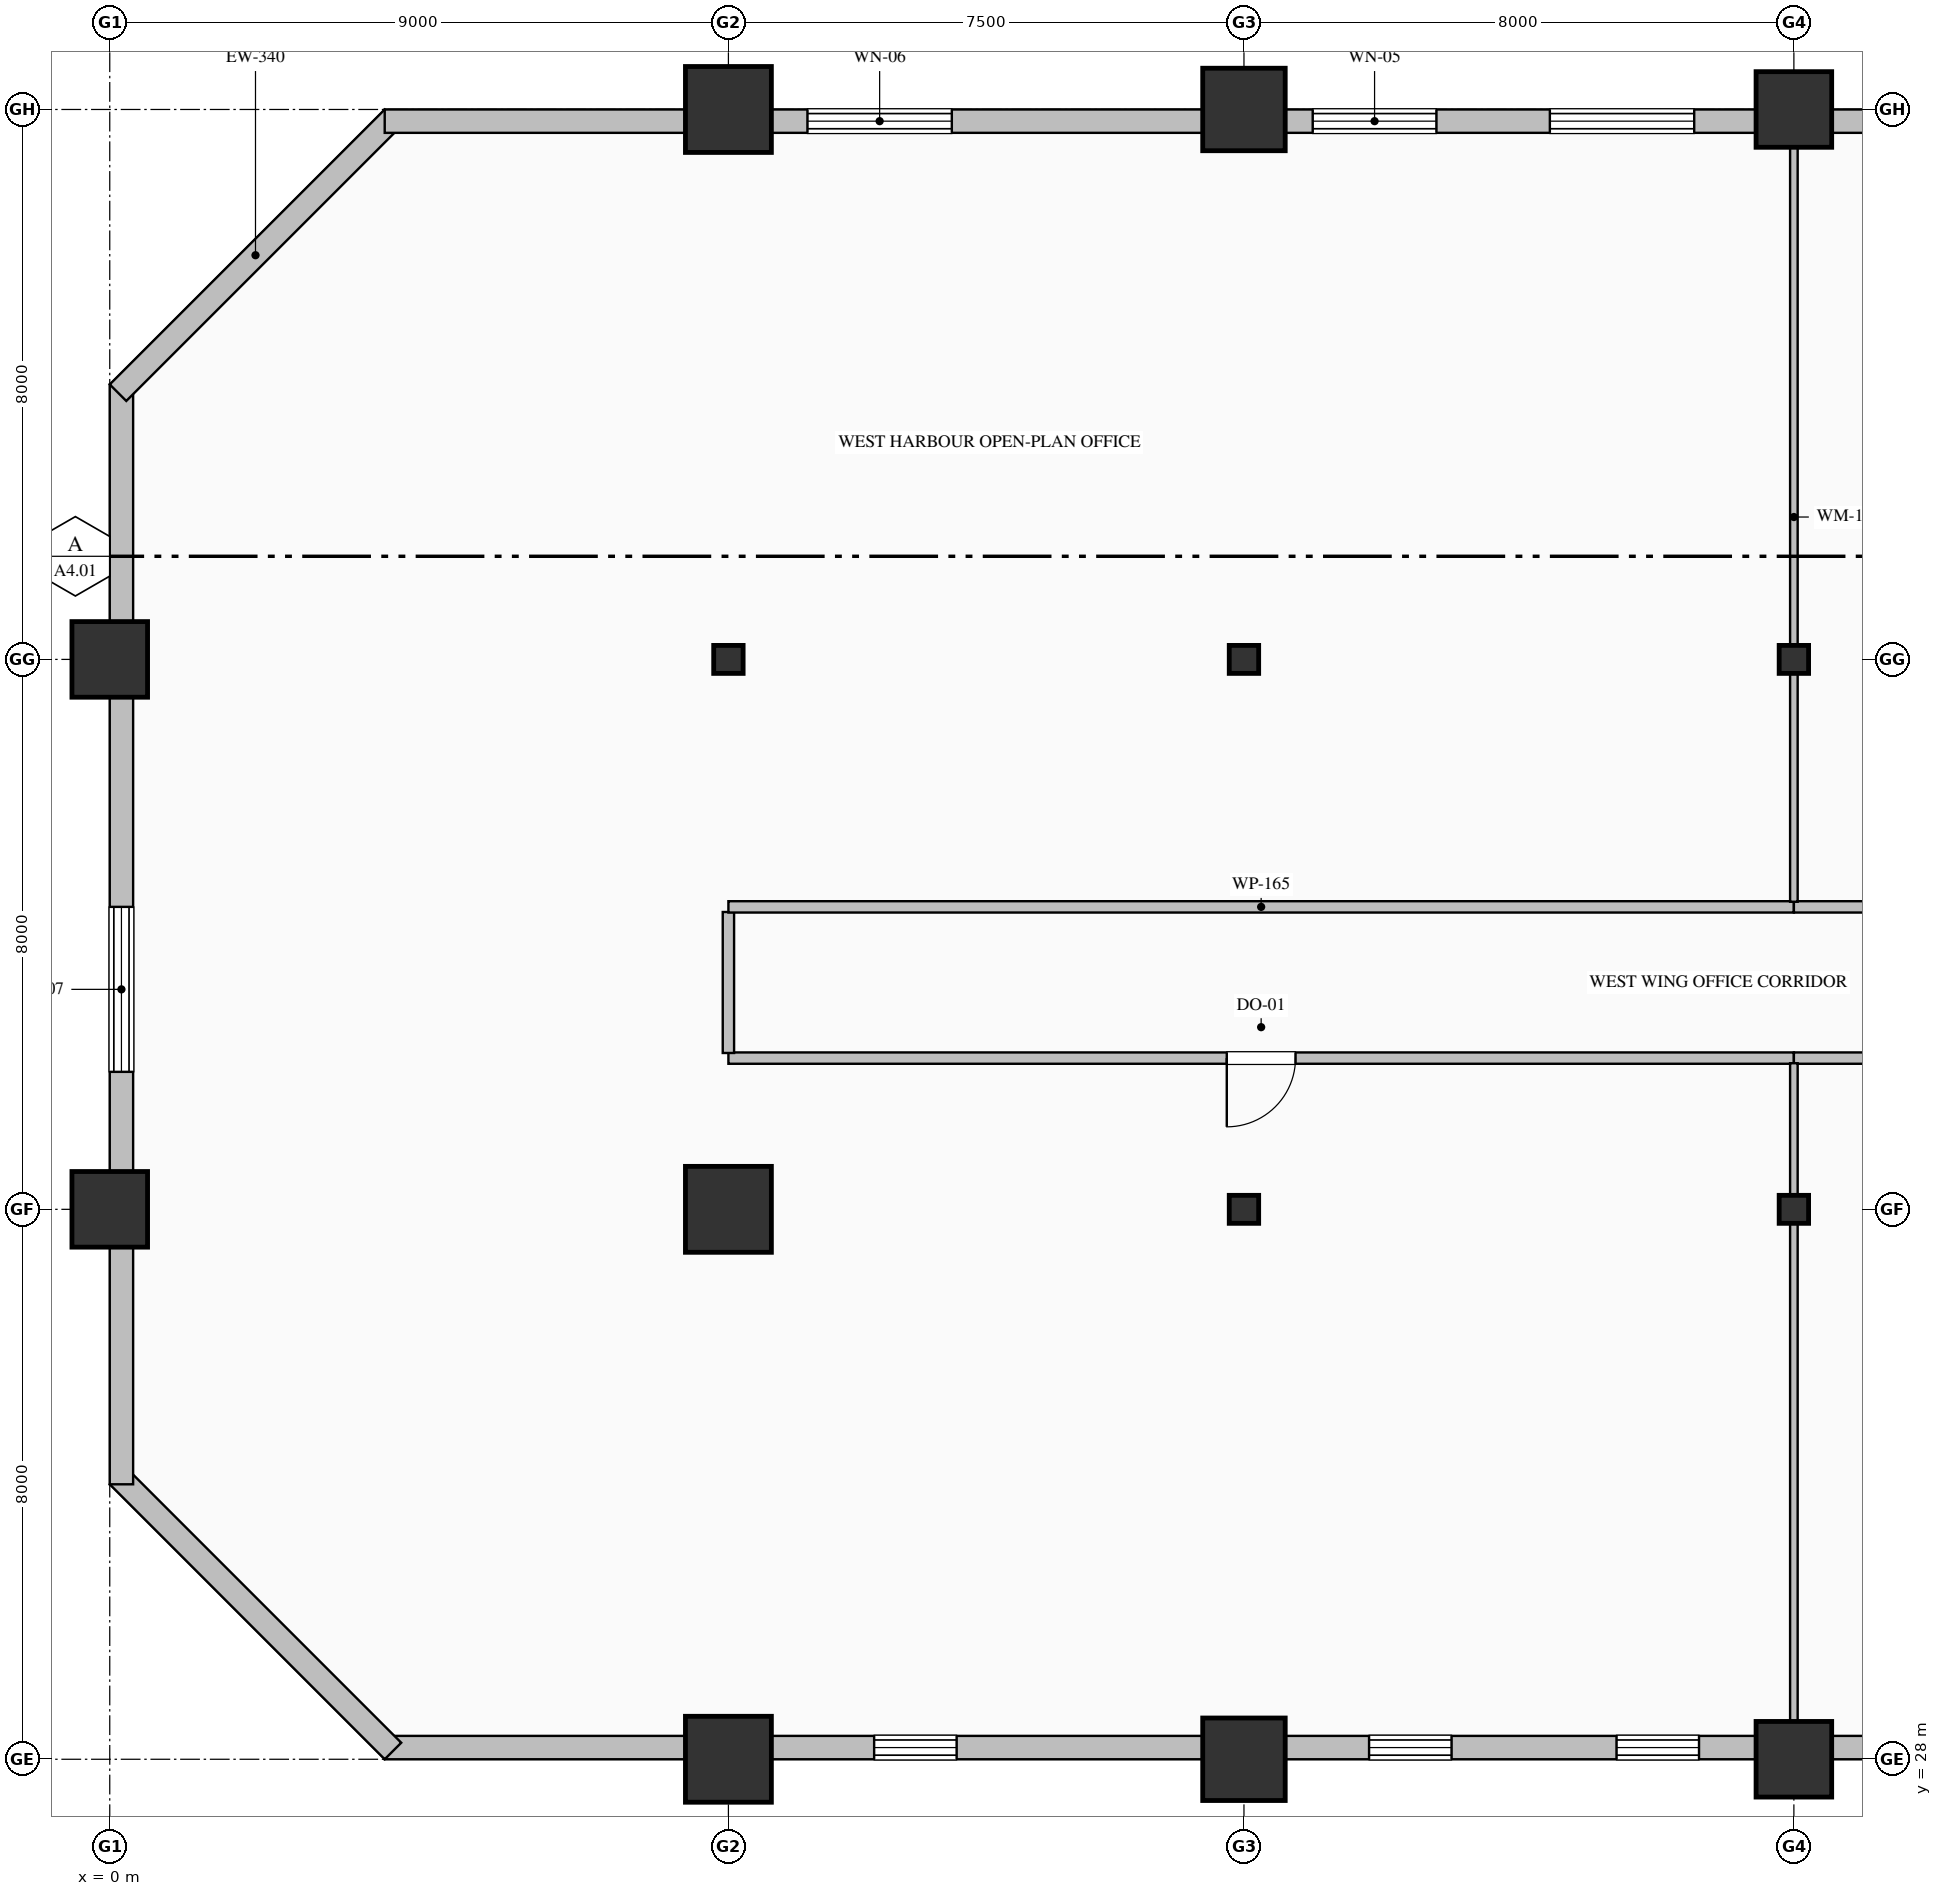
"""IFC4 building model, lengths in metres.
Left out: names, types, materials, properties, quantities, classifications, styles, units other than length and angle.
Written with IfcOpenShell. Run it as: python <this file> out.ifc"""

import sys

from ifc_helpers import new_model, si_unit, direction, frame, frame_2d, origin, origin_2d, place, context, subcontext, project, spatial, rectangle, hollow_rectangle, hollow_circle, i_section, extrude, element, fill, save


model = new_model("IFC4")
c1 = context("Model", 3, precision=1e-05, world=origin(), true_north=direction((0.0, 1.0)))
c2 = subcontext(c1, "Body", "Model", "MODEL_VIEW")
j1 = project(units=[si_unit("LENGTHUNIT", "METRE"), si_unit("PLANEANGLEUNIT", "RADIAN")], contexts=[c1])
p1 = place(None, origin())
s1 = spatial("IfcSite", under=j1, at=p1, CompositionType="ELEMENT")
p2 = place(p1, origin())
s2 = spatial("IfcBuilding", under=s1, at=p2, CompositionType="ELEMENT")
p3 = place(p2, frame((0.0, 0.0, 56.2)))
s3 = spatial("IfcBuildingStorey", under=s2, at=p3, CompositionType="ELEMENT", Elevation=56.2)
for number, where, z_axis, x_axis in (
    (1, (0.0, 36.0, 0.0), (0.0, 0.0, 1.0), (1.0, 0.0, 0.0)),
    (2, (0.0, 44.0, 0.0), (0.0, 0.0, 1.0), (1.0, 0.0, 0.0)),
):
    element("IfcColumn", number, at=place(p3, frame(where, z_axis=z_axis, x_axis=x_axis)), inside=s3, PredefinedType="COLUMN", context=c2, shape_type="SweptSolid", body=[
        extrude(hollow_rectangle(XDim=1.1, YDim=1.1, WallThickness=0.04, at=origin_2d()), origin(), (0.0, 0.0, 1.0), 4.0),
    ])
for number, where, z_axis, x_axis in (
    (3, (9.0, 28.0, 0.0), (0.0, 0.0, 1.0), (1.0, 0.0, 0.0)),
    (4, (9.0, 36.0, 0.0), (0.0, 0.0, 1.0), (1.0, 0.0, 0.0)),
):
    element("IfcColumn", number, at=place(p3, frame(where, z_axis=z_axis, x_axis=x_axis)), inside=s3, PredefinedType="COLUMN", context=c2, shape_type="SweptSolid", body=[
        extrude(hollow_rectangle(XDim=1.25, YDim=1.25, WallThickness=0.045, at=origin_2d()), origin(), (0.0, 0.0, 1.0), 4.0),
    ])
p4 = place(p3, frame((9.0, 44.0, 0.0), z_axis=(0.0, 0.0, 1.0), x_axis=(1.0, 0.0, 0.0)))
e5 = element("IfcColumn", 5, at=p4, inside=s3, PredefinedType="COLUMN", context=c2, shape_type="SweptSolid", body=[
    extrude(i_section(OverallWidth=0.407, OverallDepth=0.428, WebThickness=0.02, FlangeThickness=0.035, FilletRadius=0.022, at=origin_2d()), origin(), (0.0, 0.0, 1.0), 4.0),
])
p5 = place(p3, frame((9.0, 52.0, 0.0), z_axis=(0.0, 0.0, 1.0), x_axis=(1.0, 0.0, 0.0)))
e6 = element("IfcColumn", 6, at=p5, inside=s3, PredefinedType="COLUMN", context=c2, shape_type="SweptSolid", body=[
    extrude(hollow_rectangle(XDim=1.25, YDim=1.25, WallThickness=0.045, at=origin_2d()), origin(), (0.0, 0.0, 1.0), 4.0),
])
p6 = place(p3, frame((16.5, 28.0, 0.0), z_axis=(0.0, 0.0, 1.0), x_axis=(1.0, 0.0, 0.0)))
e7 = element("IfcColumn", 7, at=p6, inside=s3, PredefinedType="COLUMN", context=c2, shape_type="SweptSolid", body=[
    extrude(hollow_circle(Radius=0.6, WallThickness=0.04, at=origin_2d()), origin(), (0.0, 0.0, 1.0), 4.0),
])
for number, where, z_axis, x_axis in (
    (8, (16.5, 36.0, 0.0), (0.0, 0.0, 1.0), (1.0, 0.0, 0.0)),
    (9, (16.5, 44.0, 0.0), (0.0, 0.0, 1.0), (1.0, 0.0, 0.0)),
):
    element("IfcColumn", number, at=place(p3, frame(where, z_axis=z_axis, x_axis=x_axis)), inside=s3, PredefinedType="COLUMN", context=c2, shape_type="SweptSolid", body=[
        extrude(i_section(OverallWidth=0.407, OverallDepth=0.428, WebThickness=0.02, FlangeThickness=0.035, FilletRadius=0.022, at=origin_2d()), origin(), (0.0, 0.0, 1.0), 4.0),
    ])
p7 = place(p3, frame((16.5, 52.0, 0.0), z_axis=(0.0, 0.0, 1.0), x_axis=(1.0, 0.0, 0.0)))
e10 = element("IfcColumn", 10, at=p7, inside=s3, PredefinedType="COLUMN", context=c2, shape_type="SweptSolid", body=[
    extrude(hollow_circle(Radius=0.6, WallThickness=0.04, at=origin_2d()), origin(), (0.0, 0.0, 1.0), 4.0),
])
p8 = place(p3, frame((24.5, 28.0, 0.0), z_axis=(0.0, 0.0, 1.0), x_axis=(1.0, 0.0, 0.0)))
e11 = element("IfcColumn", 11, at=p8, inside=s3, PredefinedType="COLUMN", context=c2, shape_type="SweptSolid", body=[
    extrude(hollow_rectangle(XDim=1.1, YDim=1.1, WallThickness=0.04, at=origin_2d()), origin(), (0.0, 0.0, 1.0), 4.0),
])
for number, where, z_axis, x_axis in (
    (12, (24.5, 36.0, 0.0), (0.0, 0.0, 1.0), (1.0, 0.0, 0.0)),
    (13, (24.5, 44.0, 0.0), (0.0, 0.0, 1.0), (1.0, 0.0, 0.0)),
):
    element("IfcColumn", number, at=place(p3, frame(where, z_axis=z_axis, x_axis=x_axis)), inside=s3, PredefinedType="COLUMN", context=c2, shape_type="SweptSolid", body=[
        extrude(i_section(OverallWidth=0.407, OverallDepth=0.428, WebThickness=0.02, FlangeThickness=0.035, FilletRadius=0.022, at=origin_2d()), origin(), (0.0, 0.0, 1.0), 4.0),
    ])
p9 = place(p3, frame((24.5, 52.0, 0.0), z_axis=(0.0, 0.0, 1.0), x_axis=(1.0, 0.0, 0.0)))
e14 = element("IfcColumn", 14, at=p9, inside=s3, PredefinedType="COLUMN", context=c2, shape_type="SweptSolid", body=[
    extrude(hollow_rectangle(XDim=1.1, YDim=1.1, WallThickness=0.04, at=origin_2d()), origin(), (0.0, 0.0, 1.0), 4.0),
])
p10 = place(p3, frame((40.52, 28.17, 0.0), z_axis=(0.0, 0.0, 1.0), x_axis=(-1.0, 0.0, 0.0)))
e15 = element("IfcWall", 15, at=p10, inside=s3, PredefinedType="SOLIDWALL", context=c2, shape_type="SweptSolid", body=[
    extrude(rectangle(XDim=36.52, YDim=0.34, at=frame_2d((18.26, 0.0))), origin(), (0.0, 0.0, 1.0), 3.05),
])
p11 = place(p10, frame((10.2, 0.0, 0.7)))
e16 = element("IfcOpeningElement", 16, at=p11, cuts=e15, PredefinedType="OPENING", context=c2, shape_type="SweptSolid", body=[
    extrude(rectangle(XDim=1.2, YDim=1.85, at=frame_2d((0.6, 0.925))), frame((0.0, 0.18, 0.0), z_axis=(0.0, -1.0, 0.0), x_axis=(1.0, 0.0, 0.0)), (0.0, 0.0, 1.0), 0.36),
])
p12 = place(p10, frame((13.8, 0.0, 0.7)))
e17 = element("IfcOpeningElement", 17, at=p12, cuts=e15, PredefinedType="OPENING", context=c2, shape_type="SweptSolid", body=[
    extrude(rectangle(XDim=1.2, YDim=1.85, at=frame_2d((0.6, 0.925))), frame((0.0, 0.18, 0.0), z_axis=(0.0, -1.0, 0.0), x_axis=(1.0, 0.0, 0.0)), (0.0, 0.0, 1.0), 0.36),
])
p13 = place(p10, frame((17.4, 0.0, 0.7)))
e18 = element("IfcOpeningElement", 18, at=p13, cuts=e15, PredefinedType="OPENING", context=c2, shape_type="SweptSolid", body=[
    extrude(rectangle(XDim=1.2, YDim=1.85, at=frame_2d((0.6, 0.925))), frame((0.0, 0.18, 0.0), z_axis=(0.0, -1.0, 0.0), x_axis=(1.0, 0.0, 0.0)), (0.0, 0.0, 1.0), 0.36),
])
p14 = place(p10, frame((21.0, 0.0, 0.7)))
e19 = element("IfcOpeningElement", 19, at=p14, cuts=e15, PredefinedType="OPENING", context=c2, shape_type="SweptSolid", body=[
    extrude(rectangle(XDim=1.2, YDim=1.85, at=frame_2d((0.6, 0.925))), frame((0.0, 0.18, 0.0), z_axis=(0.0, -1.0, 0.0), x_axis=(1.0, 0.0, 0.0)), (0.0, 0.0, 1.0), 0.36),
])
p15 = place(p10, frame((28.2, 0.0, 0.7)))
e20 = element("IfcOpeningElement", 20, at=p15, cuts=e15, PredefinedType="OPENING", context=c2, shape_type="SweptSolid", body=[
    extrude(rectangle(XDim=1.2, YDim=1.85, at=frame_2d((0.6, 0.925))), frame((0.0, 0.18, 0.0), z_axis=(0.0, -1.0, 0.0), x_axis=(1.0, 0.0, 0.0)), (0.0, 0.0, 1.0), 0.36),
])
p16 = place(p3, frame((4.12, 28.12, 0.0), z_axis=(0.0, 0.0, 1.0), x_axis=(-0.707106781187, 0.707106781187, 0.0)))
e21 = element("IfcWall", 21, at=p16, inside=s3, PredefinedType="SOLIDWALL", context=c2, shape_type="SweptSolid", body=[
    extrude(rectangle(XDim=5.657, YDim=0.34, at=frame_2d((2.828, 0.0))), origin(), (0.0, 0.0, 1.0), 3.75),
])
p17 = place(p3, frame((0.17, 32.0, 0.0), z_axis=(0.0, 0.0, 1.0), x_axis=(0.0, 1.0, 0.0)))
e22 = element("IfcWall", 22, at=p17, inside=s3, PredefinedType="SOLIDWALL", context=c2, shape_type="SweptSolid", body=[
    extrude(rectangle(XDim=16.0, YDim=0.34, at=frame_2d((8.0, 0.0))), origin(), (0.0, 0.0, 1.0), 3.25),
])
p18 = place(p17, frame((6.0, 0.0, 0.8)))
e23 = element("IfcOpeningElement", 23, at=p18, cuts=e22, PredefinedType="OPENING", context=c2, shape_type="SweptSolid", body=[
    extrude(rectangle(XDim=2.4, YDim=2.15, at=frame_2d((1.2, 1.075))), frame((0.0, 0.18, 0.0), z_axis=(0.0, -1.0, 0.0), x_axis=(1.0, 0.0, 0.0)), (0.0, 0.0, 1.0), 0.36),
])
p19 = place(p3, frame((0.12, 47.88, 0.0), z_axis=(0.0, 0.0, 1.0), x_axis=(0.707106781187, 0.707106781187, 0.0)))
e24 = element("IfcWall", 24, at=p19, inside=s3, PredefinedType="SOLIDWALL", context=c2, shape_type="SweptSolid", body=[
    extrude(rectangle(XDim=5.657, YDim=0.34, at=frame_2d((2.828, 0.0))), origin(), (0.0, 0.0, 1.0), 3.75),
])
p20 = place(p3, frame((4.0, 51.83, 0.0), z_axis=(0.0, 0.0, 1.0), x_axis=(1.0, 0.0, 0.0)))
e25 = element("IfcWall", 25, at=p20, inside=s3, PredefinedType="SOLIDWALL", context=c2, shape_type="SweptSolid", body=[
    extrude(rectangle(XDim=36.52, YDim=0.34, at=frame_2d((18.26, 0.0))), origin(), (0.0, 0.0, 1.0), 3.25),
])
p21 = place(p20, frame((6.15, 0.0, 0.85)))
e26 = element("IfcOpeningElement", 26, at=p21, cuts=e25, PredefinedType="OPENING", context=c2, shape_type="SweptSolid", body=[
    extrude(rectangle(XDim=2.1, YDim=2.05, at=frame_2d((1.05, 1.025))), frame((0.0, 0.18, 0.0), z_axis=(0.0, -1.0, 0.0), x_axis=(1.0, 0.0, 0.0)), (0.0, 0.0, 1.0), 0.36),
])
p22 = place(p20, frame((13.5, 0.0, 0.85)))
e27 = element("IfcOpeningElement", 27, at=p22, cuts=e25, PredefinedType="OPENING", context=c2, shape_type="SweptSolid", body=[
    extrude(rectangle(XDim=1.8, YDim=2.05, at=frame_2d((0.9, 1.025))), frame((0.0, 0.18, 0.0), z_axis=(0.0, -1.0, 0.0), x_axis=(1.0, 0.0, 0.0)), (0.0, 0.0, 1.0), 0.36),
])
p23 = place(p20, frame((16.95, 0.0, 0.85)))
e28 = element("IfcOpeningElement", 28, at=p23, cuts=e25, PredefinedType="OPENING", context=c2, shape_type="SweptSolid", body=[
    extrude(rectangle(XDim=2.1, YDim=2.05, at=frame_2d((1.05, 1.025))), frame((0.0, 0.18, 0.0), z_axis=(0.0, -1.0, 0.0), x_axis=(1.0, 0.0, 0.0)), (0.0, 0.0, 1.0), 0.36),
])
p24 = place(p20, frame((24.3, 0.0, 0.85)))
e29 = element("IfcOpeningElement", 29, at=p24, cuts=e25, PredefinedType="OPENING", context=c2, shape_type="SweptSolid", body=[
    extrude(rectangle(XDim=1.8, YDim=2.05, at=frame_2d((0.9, 1.025))), frame((0.0, 0.18, 0.0), z_axis=(0.0, -1.0, 0.0), x_axis=(1.0, 0.0, 0.0)), (0.0, 0.0, 1.0), 0.36),
])
p25 = place(p3, frame((24.5, 38.2, 0.0), z_axis=(0.0, 0.0, 1.0), x_axis=(-1.0, 0.0, 0.0)))
e30 = element("IfcWall", 30, at=p25, inside=s3, PredefinedType="PARTITIONING", context=c2, shape_type="SweptSolid", body=[
    extrude(rectangle(XDim=15.5, YDim=0.165, at=frame_2d((7.75, 0.0))), origin(), (0.0, 0.0, 1.0), 3.75),
])
p26 = place(p25, frame((7.25, 0.0, 0.0)))
e31 = element("IfcOpeningElement", 31, at=p26, cuts=e30, PredefinedType="OPENING", context=c2, shape_type="SweptSolid", body=[
    extrude(rectangle(XDim=1.0, YDim=2.15, at=frame_2d((0.5, 1.075))), frame((0.0, 0.093, 0.0), z_axis=(0.0, -1.0, 0.0), x_axis=(1.0, 0.0, 0.0)), (0.0, 0.0, 1.0), 0.185),
])
p27 = place(p3, frame((9.0, 38.274, 0.0), z_axis=(0.0, 0.0, 1.0), x_axis=(0.0, 1.0, 0.0)))
e32 = element("IfcWall", 32, at=p27, inside=s3, PredefinedType="PARTITIONING", context=c2, shape_type="SweptSolid", body=[
    extrude(rectangle(XDim=2.051, YDim=0.165, at=frame_2d((1.025, 0.0))), origin(), (0.0, 0.0, 1.0), 3.042),
])
p28 = place(p3, frame((9.0, 40.4, 0.0), z_axis=(0.0, 0.0, 1.0), x_axis=(1.0, 0.0, 0.0)))
e33 = element("IfcWall", 33, at=p28, inside=s3, PredefinedType="PARTITIONING", context=c2, shape_type="SweptSolid", body=[
    extrude(rectangle(XDim=15.5, YDim=0.165, at=frame_2d((7.75, 0.0))), origin(), (0.0, 0.0, 1.0), 3.75),
])
p29 = place(p3, frame((24.5, 40.4, 0.0), z_axis=(0.0, 0.0, 1.0), x_axis=(1.0, 0.0, 0.0)))
e34 = element("IfcWall", 34, at=p29, inside=s3, PredefinedType="PARTITIONING", context=c2, shape_type="SweptSolid", body=[
    extrude(rectangle(XDim=13.3, YDim=0.165, at=frame_2d((6.65, 0.0))), origin(), (0.0, 0.0, 1.0), 3.75),
])
p30 = place(p29, frame((6.2, 0.0, 0.0)))
e35 = element("IfcOpeningElement", 35, at=p30, cuts=e34, PredefinedType="OPENING", context=c2, shape_type="SweptSolid", body=[
    extrude(rectangle(XDim=0.9, YDim=2.15, at=frame_2d((0.45, 1.075))), frame((0.0, 0.093, 0.0), z_axis=(0.0, -1.0, 0.0), x_axis=(1.0, 0.0, 0.0)), (0.0, 0.0, 1.0), 0.185),
])
p31 = place(p3, frame((31.0, 38.2, 0.0), z_axis=(0.0, 0.0, 1.0), x_axis=(-1.0, 0.0, 0.0)))
e36 = element("IfcWall", 36, at=p31, inside=s3, PredefinedType="PARTITIONING", context=c2, shape_type="SweptSolid", body=[
    extrude(rectangle(XDim=6.5, YDim=0.165, at=frame_2d((3.25, 0.0))), origin(), (0.0, 0.0, 1.0), 3.75),
])
p32 = place(p31, frame((2.75, 0.0, 0.0)))
e37 = element("IfcOpeningElement", 37, at=p32, cuts=e36, PredefinedType="OPENING", context=c2, shape_type="SweptSolid", body=[
    extrude(rectangle(XDim=1.0, YDim=2.15, at=frame_2d((0.5, 1.075))), frame((0.0, 0.093, 0.0), z_axis=(0.0, -1.0, 0.0), x_axis=(1.0, 0.0, 0.0)), (0.0, 0.0, 1.0), 0.185),
])
p33 = place(p3, frame((24.5, 51.668, 0.0), z_axis=(0.0, 0.0, 1.0), x_axis=(0.0, -1.0, 0.0)))
e38 = element("IfcWall", 38, at=p33, inside=s3, PredefinedType="MOVABLE", context=c2, shape_type="SweptSolid", body=[
    extrude(rectangle(XDim=11.193, YDim=0.11, at=frame_2d((5.597, 0.0))), origin(), (0.0, 0.0, 1.0), 3.042),
])
p34 = place(p3, frame((24.5, 38.125, 0.0), z_axis=(0.0, 0.0, 1.0), x_axis=(0.0, -1.0, 0.0)))
e39 = element("IfcWall", 39, at=p34, inside=s3, PredefinedType="MOVABLE", context=c2, shape_type="SweptSolid", body=[
    extrude(rectangle(XDim=9.793, YDim=0.11, at=frame_2d((4.897, 0.0))), origin(), (0.0, 0.0, 1.0), 3.042),
])
p35 = place(p13, origin())
e40 = element("IfcWindow", 40, at=p35, inside=s3, PartitioningType="DOUBLE_PANEL_VERTICAL", PredefinedType="WINDOW", context=c2, shape_type="SweptSolid", body=[
    extrude(rectangle(XDim=1.2, YDim=1.85, at=frame_2d((0.6, 0.925))), frame((0.0, 0.15, 0.0), z_axis=(0.0, -1.0, 0.0), x_axis=(1.0, 0.0, 0.0)), (0.0, 0.0, 1.0), 0.06),
])
fill(e18, e40)
p36 = place(p14, origin())
e41 = element("IfcWindow", 41, at=p36, inside=s3, PartitioningType="DOUBLE_PANEL_VERTICAL", PredefinedType="WINDOW", context=c2, shape_type="SweptSolid", body=[
    extrude(rectangle(XDim=1.2, YDim=1.85, at=frame_2d((0.6, 0.925))), frame((0.0, 0.15, 0.0), z_axis=(0.0, -1.0, 0.0), x_axis=(1.0, 0.0, 0.0)), (0.0, 0.0, 1.0), 0.06),
])
fill(e19, e41)
p37 = place(p15, origin())
e42 = element("IfcWindow", 42, at=p37, inside=s3, PartitioningType="DOUBLE_PANEL_VERTICAL", PredefinedType="WINDOW", context=c2, shape_type="SweptSolid", body=[
    extrude(rectangle(XDim=1.2, YDim=1.85, at=frame_2d((0.6, 0.925))), frame((0.0, 0.15, 0.0), z_axis=(0.0, -1.0, 0.0), x_axis=(1.0, 0.0, 0.0)), (0.0, 0.0, 1.0), 0.06),
])
fill(e20, e42)
p38 = place(p18, origin())
e43 = element("IfcWindow", 43, at=p38, inside=s3, PartitioningType="TRIPLE_PANEL_VERTICAL", PredefinedType="WINDOW", context=c2, shape_type="SweptSolid", body=[
    extrude(rectangle(XDim=2.4, YDim=2.15, at=frame_2d((1.2, 1.075))), frame((0.0, 0.15, 0.0), z_axis=(0.0, -1.0, 0.0), x_axis=(1.0, 0.0, 0.0)), (0.0, 0.0, 1.0), 0.06),
])
fill(e23, e43)
p39 = place(p21, origin())
e44 = element("IfcWindow", 44, at=p39, inside=s3, PartitioningType="TRIPLE_PANEL_VERTICAL", PredefinedType="WINDOW", context=c2, shape_type="SweptSolid", body=[
    extrude(rectangle(XDim=2.1, YDim=2.05, at=frame_2d((1.05, 1.025))), frame((0.0, 0.15, 0.0), z_axis=(0.0, -1.0, 0.0), x_axis=(1.0, 0.0, 0.0)), (0.0, 0.0, 1.0), 0.06),
])
fill(e26, e44)
p40 = place(p22, origin())
e45 = element("IfcWindow", 45, at=p40, inside=s3, PartitioningType="TRIPLE_PANEL_VERTICAL", PredefinedType="WINDOW", context=c2, shape_type="SweptSolid", body=[
    extrude(rectangle(XDim=1.8, YDim=2.05, at=frame_2d((0.9, 1.025))), frame((0.0, 0.15, 0.0), z_axis=(0.0, -1.0, 0.0), x_axis=(1.0, 0.0, 0.0)), (0.0, 0.0, 1.0), 0.06),
])
fill(e27, e45)
p41 = place(p23, origin())
e46 = element("IfcWindow", 46, at=p41, inside=s3, PartitioningType="TRIPLE_PANEL_VERTICAL", PredefinedType="WINDOW", context=c2, shape_type="SweptSolid", body=[
    extrude(rectangle(XDim=2.1, YDim=2.05, at=frame_2d((1.05, 1.025))), frame((0.0, 0.15, 0.0), z_axis=(0.0, -1.0, 0.0), x_axis=(1.0, 0.0, 0.0)), (0.0, 0.0, 1.0), 0.06),
])
fill(e28, e46)
p42 = place(p26, origin())
e47 = element("IfcDoor", 47, at=p42, inside=s3, OperationType="SINGLE_SWING_RIGHT", PredefinedType="DOOR", context=c2, shape_type="SweptSolid", body=[
    extrude(rectangle(XDim=1.0, YDim=2.15, at=frame_2d((0.5, 1.075))), frame((0.0, 0.025, 0.0), z_axis=(0.0, -1.0, 0.0), x_axis=(1.0, 0.0, 0.0)), (0.0, 0.0, 1.0), 0.05),
])
fill(e31, e47)
save(model, sys.argv[1])
